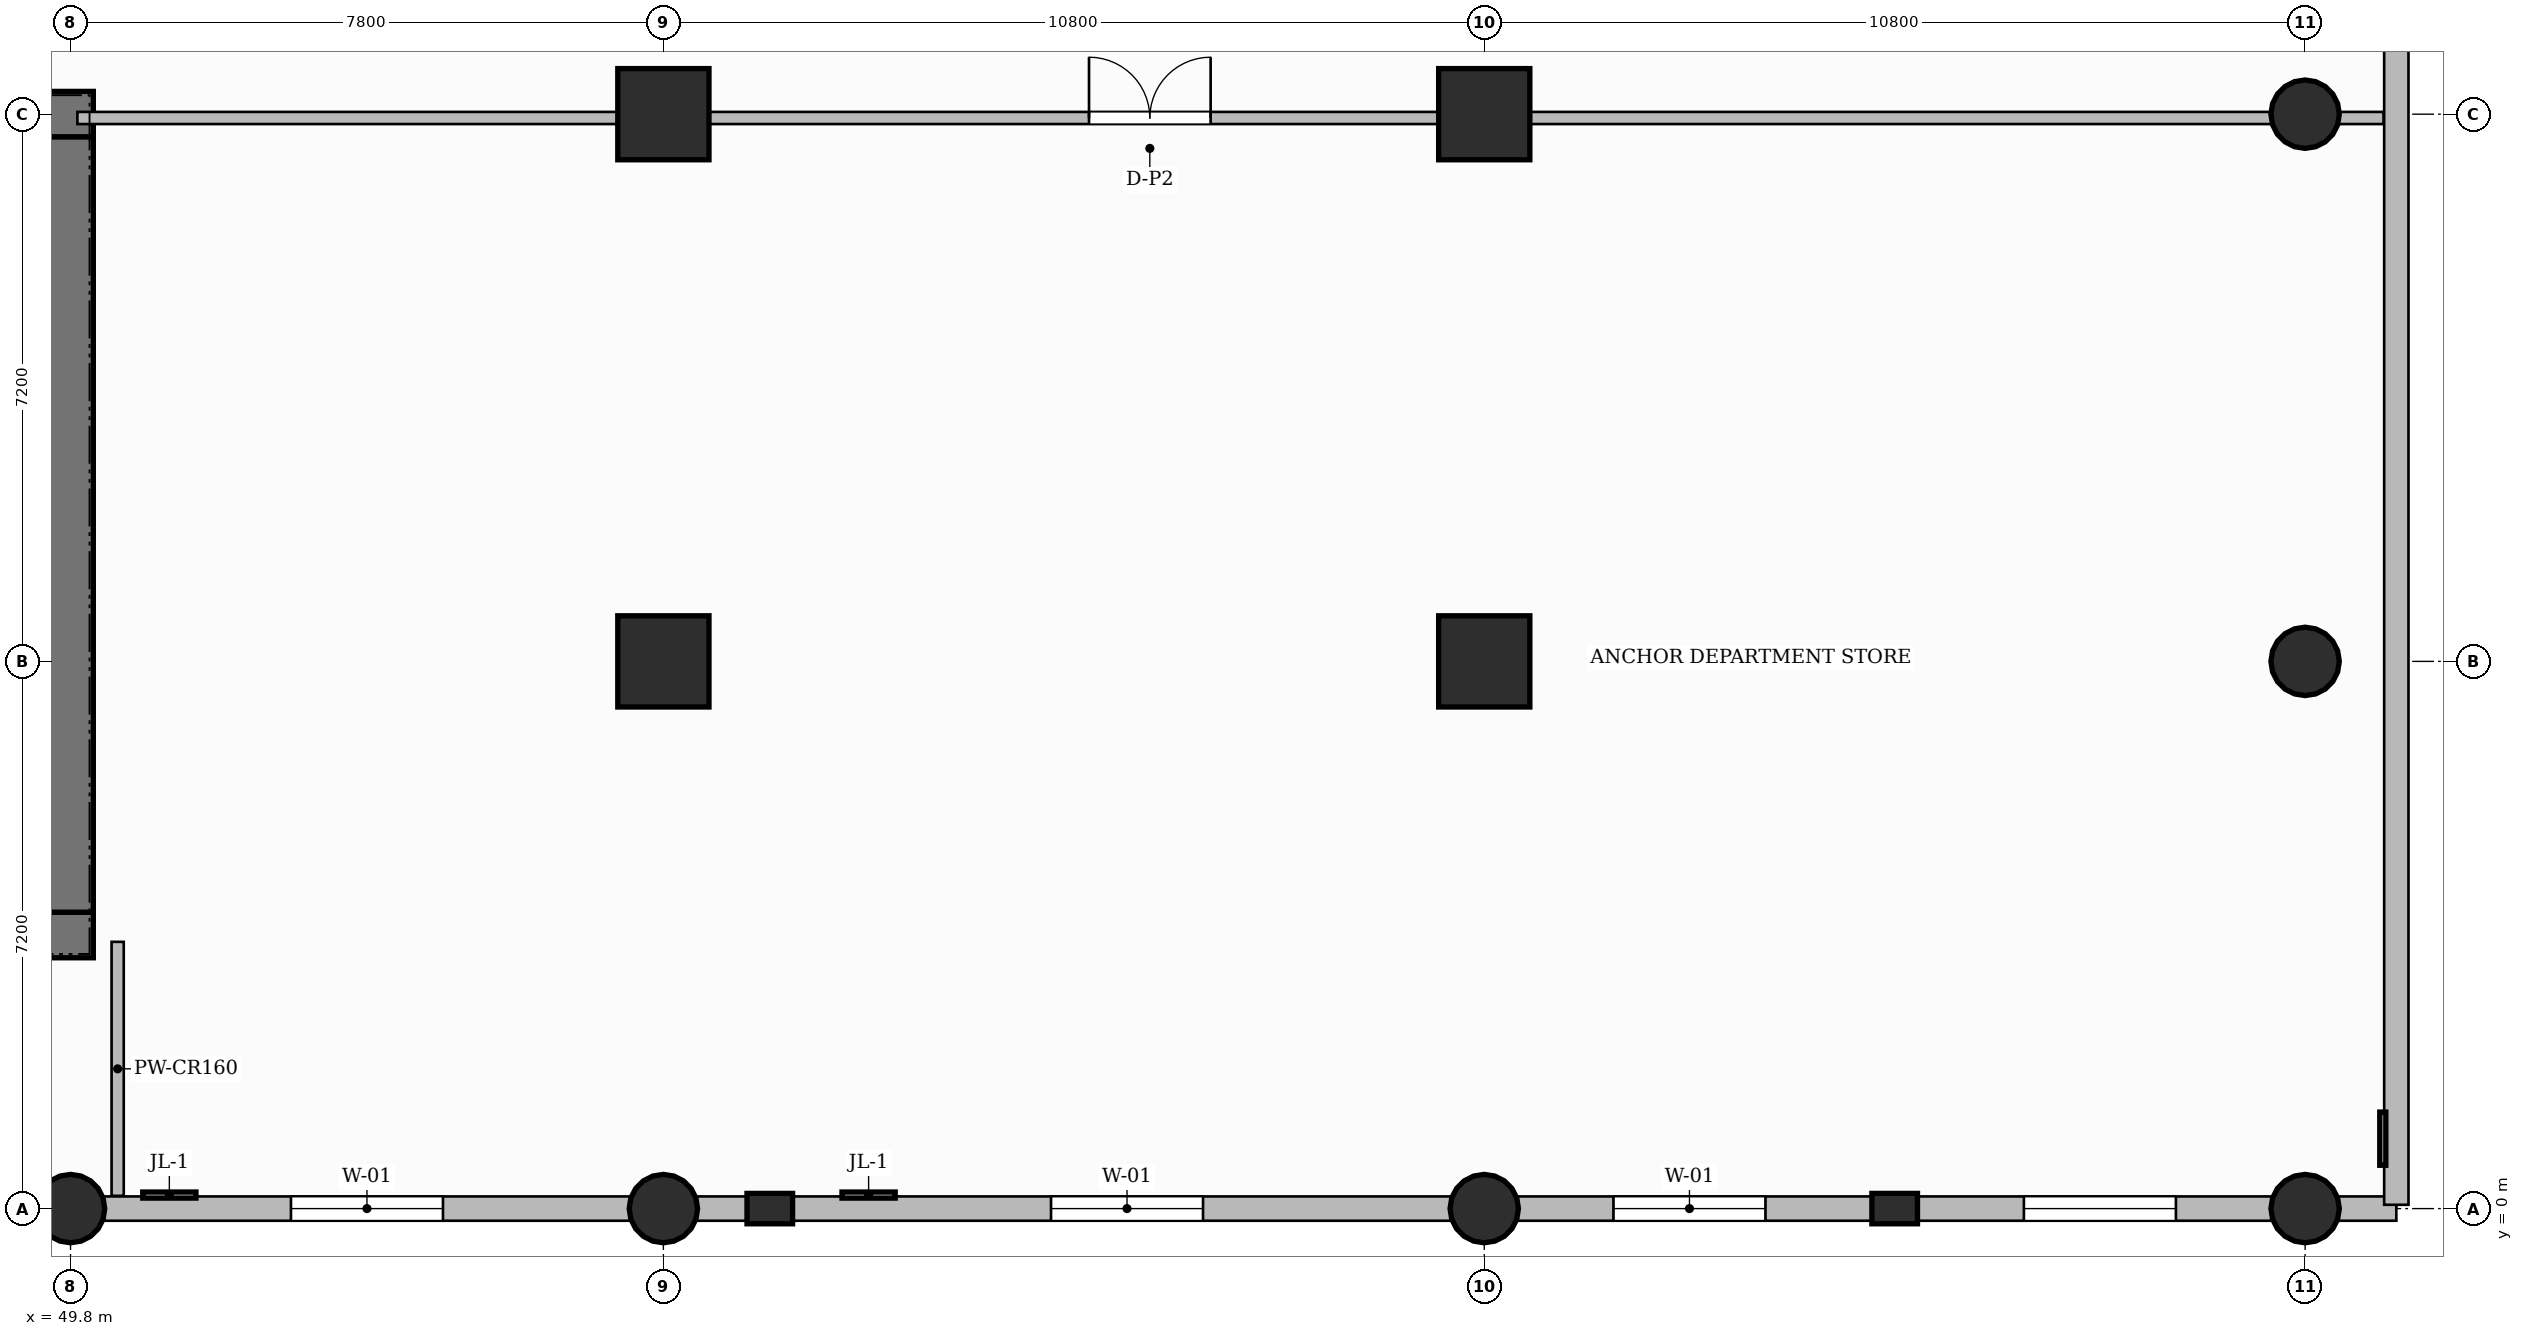
"""IFC4 building model, lengths in metres.
Left out: names, types, materials, properties, quantities, classifications, styles, units other than length and angle.
Written with IfcOpenShell. Run it as: python <this file> out.ifc"""

import sys

from ifc_helpers import new_model, si_unit, direction, frame, frame_2d, origin, origin_2d, place, context, subcontext, project, spatial, rectangle, circle, extrude, source, transform, mapped, element, fill, save


model = new_model("IFC4")
c1 = context("Model", 3, precision=1e-05, world=origin(), true_north=direction((0.0, 1.0)))
c2 = subcontext(c1, "Body", "Model", "MODEL_VIEW")
j1 = project(units=[si_unit("LENGTHUNIT", "METRE"), si_unit("PLANEANGLEUNIT", "RADIAN")], contexts=[c1])
p1 = place(None, origin())
s1 = spatial("IfcSite", under=j1, at=p1, CompositionType="ELEMENT")
p2 = place(p1, origin())
s2 = spatial("IfcBuilding", under=s1, at=p2, CompositionType="ELEMENT")
p3 = place(p2, frame((0.0, 0.0, 5.4)))
s3 = spatial("IfcBuildingStorey", under=s2, at=p3, CompositionType="ELEMENT", Elevation=5.4)
p4 = place(p3, frame((34.5, 3.6, 0.0), z_axis=(0.0, 0.0, 1.0), x_axis=(1.0, 0.0, 0.0)))
e1 = element("IfcWall", 1, at=p4, inside=s3, PredefinedType="SHEAR", context=c2, shape_type="SweptSolid", body=[
    extrude(rectangle(XDim=15.6, YDim=0.6, at=frame_2d((7.8, 0.0))), origin(), (0.0, 0.0, 1.0), 5.4),
])
p5 = place(p4, frame((4.85, 0.0, 0.0)))
e2 = element("IfcOpeningElement", 2, at=p5, cuts=e1, PredefinedType="OPENING", context=c2, shape_type="SweptSolid", body=[
    extrude(rectangle(XDim=0.9, YDim=2.1, at=frame_2d((0.45, 1.05))), frame((0.0, 0.31, 0.0), z_axis=(0.0, -1.0, 0.0), x_axis=(1.0, 0.0, 0.0)), (0.0, 0.0, 1.0), 0.62),
])
p6 = place(p4, frame((7.27, 0.0, 0.0)))
e3 = element("IfcOpeningElement", 3, at=p6, cuts=e1, PredefinedType="OPENING", context=c2, shape_type="SweptSolid", body=[
    extrude(rectangle(XDim=0.9, YDim=2.1, at=frame_2d((0.45, 1.05))), frame((0.0, 0.31, 0.0), z_axis=(0.0, -1.0, 0.0), x_axis=(1.0, 0.0, 0.0)), (0.0, 0.0, 1.0), 0.62),
])
p7 = place(p3, frame((34.5, 14.4, 0.0), z_axis=(0.0, 0.0, 1.0), x_axis=(1.0, 0.0, 0.0)))
e4 = element("IfcWall", 4, at=p7, inside=s3, PredefinedType="SHEAR", context=c2, shape_type="SweptSolid", body=[
    extrude(rectangle(XDim=15.6, YDim=0.6, at=frame_2d((7.8, 0.0))), origin(), (0.0, 0.0, 1.0), 5.4),
])
p8 = place(p7, frame((5.43, 0.0, 0.0)))
e5 = element("IfcOpeningElement", 5, at=p8, cuts=e4, PredefinedType="OPENING", context=c2, shape_type="SweptSolid", body=[
    extrude(rectangle(XDim=1.5, YDim=2.2, at=frame_2d((0.75, 1.1))), frame((0.0, 0.31, 0.0), z_axis=(0.0, -1.0, 0.0), x_axis=(1.0, 0.0, 0.0)), (0.0, 0.0, 1.0), 0.62),
])
p9 = place(p7, frame((1.645, 0.0, 0.0)))
e6 = element("IfcOpeningElement", 6, at=p9, cuts=e4, PredefinedType="OPENING", context=c2, shape_type="SweptSolid", body=[
    extrude(rectangle(XDim=1.05, YDim=2.15, at=frame_2d((0.525, 1.075))), frame((0.0, 0.31, 0.0), z_axis=(0.0, -1.0, 0.0), x_axis=(1.0, 0.0, 0.0)), (0.0, 0.0, 1.0), 0.62),
])
p10 = place(p7, frame((11.275, 0.0, 0.0)))
e7 = element("IfcOpeningElement", 7, at=p10, cuts=e4, PredefinedType="OPENING", context=c2, shape_type="SweptSolid", body=[
    extrude(rectangle(XDim=1.05, YDim=2.15, at=frame_2d((0.525, 1.075))), frame((0.0, 0.31, 0.0), z_axis=(0.0, -1.0, 0.0), x_axis=(1.0, 0.0, 0.0)), (0.0, 0.0, 1.0), 0.62),
])
p11 = place(p3, frame((49.8, 3.9, 0.0), z_axis=(0.0, 0.0, 1.0), x_axis=(0.0, 1.0, 0.0)))
e8 = element("IfcWall", 8, at=p11, inside=s3, PredefinedType="SHEAR", context=c2, shape_type="SweptSolid", body=[
    extrude(rectangle(XDim=10.2, YDim=0.6, at=frame_2d((5.1, 0.0))), origin(), (0.0, 0.0, 1.0), 5.4),
])
m1 = source(origin(), c2, "Body", "SweptSolid", [
    extrude(circle(Radius=0.45, at=origin_2d()), origin(), (0.0, 0.0, 1.0), 5.4),
])
for number, where, z_axis, x_axis in (
    (9, (49.8, 0.0, 0.0), (0.0, 0.0, 1.0), (1.0, 0.0, 0.0)),
    (10, (57.6, 0.0, 0.0), (0.0, 0.0, 1.0), (1.0, 0.0, 0.0)),
):
    element("IfcColumn", number, at=place(p3, frame(where, z_axis=z_axis, x_axis=x_axis)), inside=s3, PredefinedType="COLUMN", context=c2, shape_type="MappedRepresentation", body=[
        mapped(m1, transform((0.0, 0.0, 0.0), scale=1.0)),
    ])
m2 = source(origin(), c2, "Body", "SweptSolid", [
    extrude(rectangle(XDim=1.2, YDim=1.2, at=origin_2d()), origin(), (0.0, 0.0, 1.0), 5.4),
])
for number, where, z_axis, x_axis in (
    (11, (57.6, 7.2, 0.0), (0.0, 0.0, 1.0), (1.0, 0.0, 0.0)),
    (12, (57.6, 14.4, 0.0), (0.0, 0.0, 1.0), (1.0, 0.0, 0.0)),
):
    element("IfcColumn", number, at=place(p3, frame(where, z_axis=z_axis, x_axis=x_axis)), inside=s3, PredefinedType="COLUMN", context=c2, shape_type="MappedRepresentation", body=[
        mapped(m2, transform((0.0, 0.0, 0.0), scale=1.0)),
    ])
p12 = place(p3, frame((68.4, 0.0, 0.0), z_axis=(0.0, 0.0, 1.0), x_axis=(1.0, 0.0, 0.0)))
e13 = element("IfcColumn", 13, at=p12, inside=s3, PredefinedType="COLUMN", context=c2, shape_type="MappedRepresentation", body=[
    mapped(m1, transform((0.0, 0.0, 0.0), scale=1.0)),
])
for number, where, z_axis, x_axis in (
    (14, (68.4, 7.2, 0.0), (0.0, 0.0, 1.0), (1.0, 0.0, 0.0)),
    (15, (68.4, 14.4, 0.0), (0.0, 0.0, 1.0), (1.0, 0.0, 0.0)),
):
    element("IfcColumn", number, at=place(p3, frame(where, z_axis=z_axis, x_axis=x_axis)), inside=s3, PredefinedType="COLUMN", context=c2, shape_type="MappedRepresentation", body=[
        mapped(m2, transform((0.0, 0.0, 0.0), scale=1.0)),
    ])
for number, where, z_axis, x_axis in (
    (16, (79.2, 0.0, 0.0), (0.0, 0.0, 1.0), (1.0, 0.0, 0.0)),
    (17, (79.2, 7.2, 0.0), (0.0, 0.0, 1.0), (1.0, 0.0, 0.0)),
    (18, (79.2, 14.4, 0.0), (0.0, 0.0, 1.0), (1.0, 0.0, 0.0)),
):
    element("IfcColumn", number, at=place(p3, frame(where, z_axis=z_axis, x_axis=x_axis)), inside=s3, PredefinedType="COLUMN", context=c2, shape_type="MappedRepresentation", body=[
        mapped(m1, transform((0.0, 0.0, 0.0), scale=1.0)),
    ])
m3 = source(origin(), c2, "Body", "SweptSolid", [
    extrude(rectangle(XDim=0.6, YDim=0.4, at=origin_2d()), origin(), (0.0, 0.0, 1.0), 5.4),
])
for number, where, z_axis, x_axis in (
    (19, (59.0, 0.0, 0.0), (0.0, 0.0, 1.0), (1.0, 0.0, 0.0)),
    (20, (73.8, 0.0, 0.0), (0.0, 0.0, 1.0), (1.0, 0.0, 0.0)),
):
    element("IfcColumn", number, at=place(p3, frame(where, z_axis=z_axis, x_axis=x_axis)), inside=s3, PredefinedType="PILASTER", context=c2, shape_type="MappedRepresentation", body=[
        mapped(m3, transform((0.0, 0.0, 0.0), scale=1.0)),
    ])
p13 = place(p3, frame((49.89, 14.35, 0.0), z_axis=(0.0, 0.0, 1.0), x_axis=(1.0, 0.0, 0.0)))
e21 = element("IfcWall", 21, at=p13, inside=s3, PredefinedType="PARTITIONING", context=c2, shape_type="SweptSolid", body=[
    extrude(rectangle(XDim=30.342, YDim=0.16, at=frame_2d((15.171, 0.0))), origin(), (0.0, 0.0, 1.0), 4.185),
])
p14 = place(p13, frame((13.31, 0.0, 0.0)))
e22 = element("IfcOpeningElement", 22, at=p14, cuts=e21, PredefinedType="OPENING", context=c2, shape_type="SweptSolid", body=[
    extrude(rectangle(XDim=1.6, YDim=2.4, at=frame_2d((0.8, 1.2))), frame((0.0, 0.09, 0.0), z_axis=(0.0, -1.0, 0.0), x_axis=(1.0, 0.0, 0.0)), (0.0, 0.0, 1.0), 0.18),
])
p15 = place(p3, frame((50.42, 0.168, 0.0), z_axis=(0.0, 0.0, 1.0), x_axis=(0.0, 1.0, 0.0)))
e23 = element("IfcWall", 23, at=p15, inside=s3, PredefinedType="PARTITIONING", context=c2, shape_type="SweptSolid", body=[
    extrude(rectangle(XDim=3.342, YDim=0.16, at=frame_2d((1.671, 0.0))), origin(), (0.0, 0.0, 1.0), 5.1),
])
p16 = place(p3, frame((28.35, 0.0, 0.0), z_axis=(0.0, 0.0, 1.0), x_axis=(1.0, 0.0, 0.0)))
e24 = element("IfcWall", 24, at=p16, inside=s3, PredefinedType="SOLIDWALL", context=c2, shape_type="SweptSolid", body=[
    extrude(rectangle(XDim=52.05, YDim=0.32, at=frame_2d((26.025, 0.0))), origin(), (0.0, 0.0, 1.0), 4.185),
])
p17 = place(p16, frame((2.45, 0.0, 0.75)))
e25 = element("IfcOpeningElement", 25, at=p17, cuts=e24, PredefinedType="OPENING", context=c2, shape_type="SweptSolid", body=[
    extrude(rectangle(XDim=2.0, YDim=2.6, at=frame_2d((1.0, 1.3))), frame((0.0, 0.17, 0.0), z_axis=(0.0, -1.0, 0.0), x_axis=(1.0, 0.0, 0.0)), (0.0, 0.0, 1.0), 0.34),
])
p18 = place(p16, frame((9.05, 0.0, 0.75)))
e26 = element("IfcOpeningElement", 26, at=p18, cuts=e24, PredefinedType="OPENING", context=c2, shape_type="SweptSolid", body=[
    extrude(rectangle(XDim=2.0, YDim=2.6, at=frame_2d((1.0, 1.3))), frame((0.0, 0.17, 0.0), z_axis=(0.0, -1.0, 0.0), x_axis=(1.0, 0.0, 0.0)), (0.0, 0.0, 1.0), 0.34),
])
p19 = place(p16, frame((16.55, 0.0, 0.75)))
e27 = element("IfcOpeningElement", 27, at=p19, cuts=e24, PredefinedType="OPENING", context=c2, shape_type="SweptSolid", body=[
    extrude(rectangle(XDim=2.0, YDim=2.6, at=frame_2d((1.0, 1.3))), frame((0.0, 0.17, 0.0), z_axis=(0.0, -1.0, 0.0), x_axis=(1.0, 0.0, 0.0)), (0.0, 0.0, 1.0), 0.34),
])
p20 = place(p16, frame((24.35, 0.0, 0.75)))
e28 = element("IfcOpeningElement", 28, at=p20, cuts=e24, PredefinedType="OPENING", context=c2, shape_type="SweptSolid", body=[
    extrude(rectangle(XDim=2.0, YDim=2.6, at=frame_2d((1.0, 1.3))), frame((0.0, 0.17, 0.0), z_axis=(0.0, -1.0, 0.0), x_axis=(1.0, 0.0, 0.0)), (0.0, 0.0, 1.0), 0.34),
])
p21 = place(p16, frame((34.35, 0.0, 0.75)))
e29 = element("IfcOpeningElement", 29, at=p21, cuts=e24, PredefinedType="OPENING", context=c2, shape_type="SweptSolid", body=[
    extrude(rectangle(XDim=2.0, YDim=2.6, at=frame_2d((1.0, 1.3))), frame((0.0, 0.17, 0.0), z_axis=(0.0, -1.0, 0.0), x_axis=(1.0, 0.0, 0.0)), (0.0, 0.0, 1.0), 0.34),
])
p22 = place(p16, frame((41.75, 0.0, 0.75)))
e30 = element("IfcOpeningElement", 30, at=p22, cuts=e24, PredefinedType="OPENING", context=c2, shape_type="SweptSolid", body=[
    extrude(rectangle(XDim=2.0, YDim=2.6, at=frame_2d((1.0, 1.3))), frame((0.0, 0.17, 0.0), z_axis=(0.0, -1.0, 0.0), x_axis=(1.0, 0.0, 0.0)), (0.0, 0.0, 1.0), 0.34),
])
p23 = place(p16, frame((47.15, 0.0, 0.75)))
e31 = element("IfcOpeningElement", 31, at=p23, cuts=e24, PredefinedType="OPENING", context=c2, shape_type="SweptSolid", body=[
    extrude(rectangle(XDim=2.0, YDim=2.6, at=frame_2d((1.0, 1.3))), frame((0.0, 0.17, 0.0), z_axis=(0.0, -1.0, 0.0), x_axis=(1.0, 0.0, 0.0)), (0.0, 0.0, 1.0), 0.34),
])
p24 = place(p3, frame((80.4, 0.05, 0.0), z_axis=(0.0, 0.0, 1.0), x_axis=(0.0, 1.0, 0.0)))
e32 = element("IfcWall", 32, at=p24, inside=s3, PredefinedType="SOLIDWALL", context=c2, shape_type="SweptSolid", body=[
    extrude(rectangle(XDim=46.7, YDim=0.32, at=frame_2d((23.35, 0.0))), origin(), (0.0, 0.0, 1.0), 5.1),
])
p25 = place(p24, frame((22.35, 0.0, 0.75)))
e33 = element("IfcOpeningElement", 33, at=p25, cuts=e32, PredefinedType="OPENING", context=c2, shape_type="SweptSolid", body=[
    extrude(rectangle(XDim=2.0, YDim=2.6, at=frame_2d((1.0, 1.3))), frame((0.0, 0.17, 0.0), z_axis=(0.0, -1.0, 0.0), x_axis=(1.0, 0.0, 0.0)), (0.0, 0.0, 1.0), 0.34),
])
m4 = source(origin(), c2, "Body", "SweptSolid", [
    extrude(rectangle(XDim=1.6, YDim=2.4, at=frame_2d((0.8, 1.2))), frame((0.0, 0.025, 0.0), z_axis=(0.0, -1.0, 0.0), x_axis=(1.0, 0.0, 0.0)), (0.0, 0.0, 1.0), 0.05),
])
p26 = place(p14, origin())
e34 = element("IfcDoor", 34, at=p26, inside=s3, OperationType="DOUBLE_DOOR_SINGLE_SWING", PredefinedType="DOOR", context=c2, shape_type="MappedRepresentation", body=[
    mapped(m4, transform((0.0, 0.0, 0.0), scale=1.0)),
])
fill(e22, e34)
m5 = source(origin(), c2, "Body", "SweptSolid", [
    extrude(rectangle(XDim=2.0, YDim=2.6, at=frame_2d((1.0, 1.3))), frame((0.0, 0.03, 0.0), z_axis=(0.0, -1.0, 0.0), x_axis=(1.0, 0.0, 0.0)), (0.0, 0.0, 1.0), 0.06),
])
p27 = place(p20, origin())
e35 = element("IfcWindow", 35, at=p27, inside=s3, PartitioningType="DOUBLE_PANEL_VERTICAL", PredefinedType="WINDOW", context=c2, shape_type="MappedRepresentation", body=[
    mapped(m5, transform((0.0, 0.0, 0.0), scale=1.0)),
])
fill(e28, e35)
p28 = place(p21, origin())
e36 = element("IfcWindow", 36, at=p28, inside=s3, PartitioningType="DOUBLE_PANEL_VERTICAL", PredefinedType="WINDOW", context=c2, shape_type="MappedRepresentation", body=[
    mapped(m5, transform((0.0, 0.0, 0.0), scale=1.0)),
])
fill(e29, e36)
p29 = place(p22, origin())
e37 = element("IfcWindow", 37, at=p29, inside=s3, PartitioningType="DOUBLE_PANEL_VERTICAL", PredefinedType="WINDOW", context=c2, shape_type="MappedRepresentation", body=[
    mapped(m5, transform((0.0, 0.0, 0.0), scale=1.0)),
])
fill(e30, e37)
p30 = place(p23, origin())
e38 = element("IfcWindow", 38, at=p30, inside=s3, PartitioningType="DOUBLE_PANEL_VERTICAL", PredefinedType="WINDOW", context=c2, shape_type="MappedRepresentation", body=[
    mapped(m5, transform((0.0, 0.0, 0.0), scale=1.0)),
])
fill(e31, e38)
save(model, sys.argv[1])
